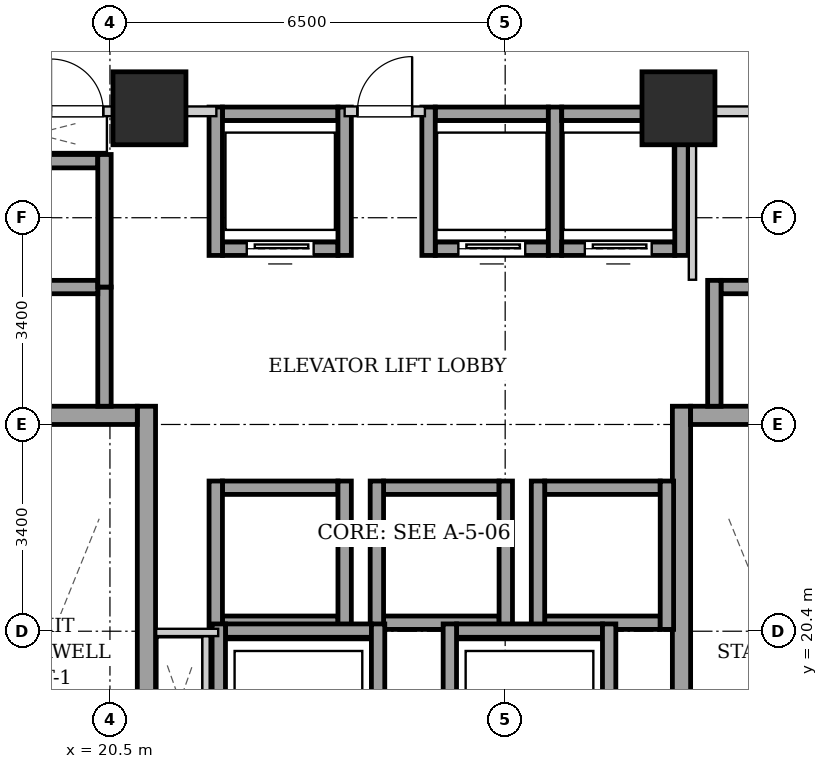
"""IFC4 building model, lengths in metres.
Left out: names, types, materials, properties, quantities, classifications, styles, units other than length and angle.
Written with IfcOpenShell. Run it as: python <this file> out.ifc"""

import sys

from ifc_helpers import new_model, si_unit, direction, frame, frame_2d, origin, origin_2d, place, context, subcontext, project, spatial, rectangle, extrude, element, fill, save


model = new_model("IFC4")
c1 = context("Model", 3, precision=1e-05, world=origin(), true_north=direction((0.0, 1.0)))
c2 = subcontext(c1, "Body", "Model", "MODEL_VIEW")
j1 = project(units=[si_unit("LENGTHUNIT", "METRE"), si_unit("PLANEANGLEUNIT", "RADIAN")], contexts=[c1])
p1 = place(None, origin())
s1 = spatial("IfcSite", under=j1, at=p1, CompositionType="ELEMENT")
p2 = place(p1, origin())
s2 = spatial("IfcBuilding", under=s1, at=p2, CompositionType="ELEMENT")
p3 = place(p2, frame((0.0, 0.0, 48.2)))
s3 = spatial("IfcBuildingStorey", under=s2, at=p3, CompositionType="ELEMENT", Elevation=48.2)
for number, where, z_axis, x_axis in (
    (1, (21.15, 29.0, 0.0), (0.0, 0.0, 1.0), (1.0, 0.0, 0.0)),
    (2, (29.85, 29.0, 0.0), (0.0, 0.0, 1.0), (1.0, 0.0, 0.0)),
):
    element("IfcColumn", number, at=place(p3, frame(where, z_axis=z_axis, x_axis=x_axis)), inside=s3, PredefinedType="COLUMN", context=c2, shape_type="SweptSolid", body=[
        extrude(rectangle(XDim=1.2, YDim=1.2, at=origin_2d()), origin(), (0.0, 0.0, 1.0), 3.2),
    ])
p4 = place(p3, frame((21.1, 15.1, 0.0), z_axis=(0.0, 0.0, 1.0), x_axis=(0.0, 1.0, 0.0)))
e3 = element("IfcWall", 3, at=p4, inside=s3, PredefinedType="SHEAR", context=c2, shape_type="SweptSolid", body=[
    extrude(rectangle(XDim=9.0, YDim=0.3, at=frame_2d((4.5, 0.0))), origin(), (0.0, 0.0, 1.0), 2.94),
])
p5 = place(p3, frame((18.1, 23.95, 0.0), z_axis=(0.0, 0.0, 1.0), x_axis=(1.0, 0.0, 0.0)))
e4 = element("IfcWall", 4, at=p5, inside=s3, PredefinedType="SHEAR", context=c2, shape_type="SweptSolid", body=[
    extrude(rectangle(XDim=2.85, YDim=0.3, at=frame_2d((1.425, 0.0))), origin(), (0.0, 0.0, 1.0), 2.94),
])
p6 = place(p3, frame((29.9, 15.1, 0.0), z_axis=(0.0, 0.0, 1.0), x_axis=(0.0, 1.0, 0.0)))
e5 = element("IfcWall", 5, at=p6, inside=s3, PredefinedType="SHEAR", context=c2, shape_type="SweptSolid", body=[
    extrude(rectangle(XDim=9.0, YDim=0.3, at=frame_2d((4.5, 0.0))), origin(), (0.0, 0.0, 1.0), 2.94),
])
p7 = place(p3, frame((30.05, 23.95, 0.0), z_axis=(0.0, 0.0, 1.0), x_axis=(1.0, 0.0, 0.0)))
e6 = element("IfcWall", 6, at=p7, inside=s3, PredefinedType="SHEAR", context=c2, shape_type="SweptSolid", body=[
    extrude(rectangle(XDim=2.85, YDim=0.3, at=frame_2d((1.425, 0.0))), origin(), (0.0, 0.0, 1.0), 2.94),
])
p8 = place(p3, frame((22.35, 26.69, 0.0), z_axis=(0.0, 0.0, 1.0), x_axis=(1.0, 0.0, 0.0)))
e7 = element("IfcWall", 7, at=p8, inside=s3, PredefinedType="SHEAR", context=c2, shape_type="SweptSolid", body=[
    extrude(rectangle(XDim=1.9, YDim=0.22, at=frame_2d((0.95, 0.0))), origin(), (0.0, 0.0, 1.0), 2.94),
])
p9 = place(p8, frame((0.4, 0.0, 0.0)))
e8 = element("IfcOpeningElement", 8, at=p9, cuts=e7, PredefinedType="OPENING", context=c2, shape_type="SweptSolid", body=[
    extrude(rectangle(XDim=1.1, YDim=2.15, at=frame_2d((0.55, 1.075))), frame((0.0, 0.12, 0.0), z_axis=(0.0, -1.0, 0.0), x_axis=(1.0, 0.0, 0.0)), (0.0, 0.0, 1.0), 0.24),
])
p10 = place(p3, frame((22.35, 28.91, 0.0), z_axis=(0.0, 0.0, 1.0), x_axis=(1.0, 0.0, 0.0)))
e9 = element("IfcWall", 9, at=p10, inside=s3, PredefinedType="SHEAR", context=c2, shape_type="SweptSolid", body=[
    extrude(rectangle(XDim=1.9, YDim=0.22, at=frame_2d((0.95, 0.0))), origin(), (0.0, 0.0, 1.0), 2.94),
])
for number, where, z_axis, x_axis in (
    (10, (22.24, 26.58, 0.0), (0.0, 0.0, 1.0), (0.0, 1.0, 0.0)),
    (11, (24.36, 26.58, 0.0), (0.0, 0.0, 1.0), (0.0, 1.0, 0.0)),
):
    element("IfcWall", number, at=place(p3, frame(where, z_axis=z_axis, x_axis=x_axis)), inside=s3, PredefinedType="SHEAR", context=c2, shape_type="SweptSolid", body=[
        extrude(rectangle(XDim=2.44, YDim=0.22, at=frame_2d((1.22, 0.0))), origin(), (0.0, 0.0, 1.0), 2.94),
    ])
p11 = place(p3, frame((25.85, 26.69, 0.0), z_axis=(0.0, 0.0, 1.0), x_axis=(1.0, 0.0, 0.0)))
e12 = element("IfcWall", 12, at=p11, inside=s3, PredefinedType="SHEAR", context=c2, shape_type="SweptSolid", body=[
    extrude(rectangle(XDim=1.86, YDim=0.22, at=frame_2d((0.93, 0.0))), origin(), (0.0, 0.0, 1.0), 2.94),
])
p12 = place(p11, frame((0.38, 0.0, 0.0)))
e13 = element("IfcOpeningElement", 13, at=p12, cuts=e12, PredefinedType="OPENING", context=c2, shape_type="SweptSolid", body=[
    extrude(rectangle(XDim=1.1, YDim=2.15, at=frame_2d((0.55, 1.075))), frame((0.0, 0.12, 0.0), z_axis=(0.0, -1.0, 0.0), x_axis=(1.0, 0.0, 0.0)), (0.0, 0.0, 1.0), 0.24),
])
p13 = place(p3, frame((25.85, 28.91, 0.0), z_axis=(0.0, 0.0, 1.0), x_axis=(1.0, 0.0, 0.0)))
e14 = element("IfcWall", 14, at=p13, inside=s3, PredefinedType="SHEAR", context=c2, shape_type="SweptSolid", body=[
    extrude(rectangle(XDim=1.86, YDim=0.22, at=frame_2d((0.93, 0.0))), origin(), (0.0, 0.0, 1.0), 2.94),
])
for number, where, z_axis, x_axis in (
    (15, (25.74, 26.58, 0.0), (0.0, 0.0, 1.0), (0.0, 1.0, 0.0)),
    (16, (27.82, 26.58, 0.0), (0.0, 0.0, 1.0), (0.0, 1.0, 0.0)),
):
    element("IfcWall", number, at=place(p3, frame(where, z_axis=z_axis, x_axis=x_axis)), inside=s3, PredefinedType="SHEAR", context=c2, shape_type="SweptSolid", body=[
        extrude(rectangle(XDim=2.44, YDim=0.22, at=frame_2d((1.22, 0.0))), origin(), (0.0, 0.0, 1.0), 2.94),
    ])
p14 = place(p3, frame((27.93, 26.69, 0.0), z_axis=(0.0, 0.0, 1.0), x_axis=(1.0, 0.0, 0.0)))
e17 = element("IfcWall", 17, at=p14, inside=s3, PredefinedType="SHEAR", context=c2, shape_type="SweptSolid", body=[
    extrude(rectangle(XDim=1.86, YDim=0.22, at=frame_2d((0.93, 0.0))), origin(), (0.0, 0.0, 1.0), 2.94),
])
p15 = place(p14, frame((0.38, 0.0, 0.0)))
e18 = element("IfcOpeningElement", 18, at=p15, cuts=e17, PredefinedType="OPENING", context=c2, shape_type="SweptSolid", body=[
    extrude(rectangle(XDim=1.1, YDim=2.15, at=frame_2d((0.55, 1.075))), frame((0.0, 0.12, 0.0), z_axis=(0.0, -1.0, 0.0), x_axis=(1.0, 0.0, 0.0)), (0.0, 0.0, 1.0), 0.24),
])
p16 = place(p3, frame((27.93, 28.91, 0.0), z_axis=(0.0, 0.0, 1.0), x_axis=(1.0, 0.0, 0.0)))
e19 = element("IfcWall", 19, at=p16, inside=s3, PredefinedType="SHEAR", context=c2, shape_type="SweptSolid", body=[
    extrude(rectangle(XDim=1.86, YDim=0.22, at=frame_2d((0.93, 0.0))), origin(), (0.0, 0.0, 1.0), 2.94),
])
p17 = place(p3, frame((29.9, 26.58, 0.0), z_axis=(0.0, 0.0, 1.0), x_axis=(0.0, 1.0, 0.0)))
e20 = element("IfcWall", 20, at=p17, inside=s3, PredefinedType="SHEAR", context=c2, shape_type="SweptSolid", body=[
    extrude(rectangle(XDim=2.44, YDim=0.22, at=frame_2d((1.22, 0.0))), origin(), (0.0, 0.0, 1.0), 2.94),
])
for number, where, z_axis, x_axis in (
    (21, (22.35, 20.54, 0.0), (0.0, 0.0, 1.0), (1.0, 0.0, 0.0)),
    (22, (22.35, 22.76, 0.0), (0.0, 0.0, 1.0), (1.0, 0.0, 0.0)),
):
    element("IfcWall", number, at=place(p3, frame(where, z_axis=z_axis, x_axis=x_axis)), inside=s3, PredefinedType="SHEAR", context=c2, shape_type="SweptSolid", body=[
        extrude(rectangle(XDim=1.9, YDim=0.22, at=frame_2d((0.95, 0.0))), origin(), (0.0, 0.0, 1.0), 2.94),
    ])
for number, where, z_axis, x_axis in (
    (23, (22.24, 20.43, 0.0), (0.0, 0.0, 1.0), (0.0, 1.0, 0.0)),
    (24, (24.36, 20.43, 0.0), (0.0, 0.0, 1.0), (0.0, 1.0, 0.0)),
):
    element("IfcWall", number, at=place(p3, frame(where, z_axis=z_axis, x_axis=x_axis)), inside=s3, PredefinedType="SHEAR", context=c2, shape_type="SweptSolid", body=[
        extrude(rectangle(XDim=2.44, YDim=0.22, at=frame_2d((1.22, 0.0))), origin(), (0.0, 0.0, 1.0), 2.94),
    ])
for number, where, z_axis, x_axis in (
    (25, (25.0, 20.54, 0.0), (0.0, 0.0, 1.0), (1.0, 0.0, 0.0)),
    (26, (25.0, 22.76, 0.0), (0.0, 0.0, 1.0), (1.0, 0.0, 0.0)),
):
    element("IfcWall", number, at=place(p3, frame(where, z_axis=z_axis, x_axis=x_axis)), inside=s3, PredefinedType="SHEAR", context=c2, shape_type="SweptSolid", body=[
        extrude(rectangle(XDim=1.9, YDim=0.22, at=frame_2d((0.95, 0.0))), origin(), (0.0, 0.0, 1.0), 2.94),
    ])
for number, where, z_axis, x_axis in (
    (27, (24.89, 20.43, 0.0), (0.0, 0.0, 1.0), (0.0, 1.0, 0.0)),
    (28, (27.01, 20.43, 0.0), (0.0, 0.0, 1.0), (0.0, 1.0, 0.0)),
):
    element("IfcWall", number, at=place(p3, frame(where, z_axis=z_axis, x_axis=x_axis)), inside=s3, PredefinedType="SHEAR", context=c2, shape_type="SweptSolid", body=[
        extrude(rectangle(XDim=2.44, YDim=0.22, at=frame_2d((1.22, 0.0))), origin(), (0.0, 0.0, 1.0), 2.94),
    ])
for number, where, z_axis, x_axis in (
    (29, (27.65, 20.54, 0.0), (0.0, 0.0, 1.0), (1.0, 0.0, 0.0)),
    (30, (27.65, 22.76, 0.0), (0.0, 0.0, 1.0), (1.0, 0.0, 0.0)),
):
    element("IfcWall", number, at=place(p3, frame(where, z_axis=z_axis, x_axis=x_axis)), inside=s3, PredefinedType="SHEAR", context=c2, shape_type="SweptSolid", body=[
        extrude(rectangle(XDim=1.9, YDim=0.22, at=frame_2d((0.95, 0.0))), origin(), (0.0, 0.0, 1.0), 2.94),
    ])
for number, where, z_axis, x_axis in (
    (31, (27.54, 20.43, 0.0), (0.0, 0.0, 1.0), (0.0, 1.0, 0.0)),
    (32, (29.66, 20.43, 0.0), (0.0, 0.0, 1.0), (0.0, 1.0, 0.0)),
):
    element("IfcWall", number, at=place(p3, frame(where, z_axis=z_axis, x_axis=x_axis)), inside=s3, PredefinedType="SHEAR", context=c2, shape_type="SweptSolid", body=[
        extrude(rectangle(XDim=2.44, YDim=0.22, at=frame_2d((1.22, 0.0))), origin(), (0.0, 0.0, 1.0), 2.94),
    ])
p18 = place(p3, frame((20.41, 24.1, 0.0), z_axis=(0.0, 0.0, 1.0), x_axis=(0.0, 1.0, 0.0)))
e33 = element("IfcWall", 33, at=p18, inside=s3, PredefinedType="SHEAR", context=c2, shape_type="SweptSolid", body=[
    extrude(rectangle(XDim=1.96, YDim=0.22, at=frame_2d((0.98, 0.0))), origin(), (0.0, 0.0, 1.0), 2.94),
])
for number, where, z_axis, x_axis in (
    (34, (18.4, 26.06, 0.0), (0.0, 0.0, 1.0), (1.0, 0.0, 0.0)),
    (35, (18.4, 28.13, 0.0), (0.0, 0.0, 1.0), (1.0, 0.0, 0.0)),
):
    element("IfcWall", number, at=place(p3, frame(where, z_axis=z_axis, x_axis=x_axis)), inside=s3, PredefinedType="SHEAR", context=c2, shape_type="SweptSolid", body=[
        extrude(rectangle(XDim=1.9, YDim=0.22, at=frame_2d((0.95, 0.0))), origin(), (0.0, 0.0, 1.0), 2.94),
    ])
p19 = place(p3, frame((20.41, 26.06, 0.0), z_axis=(0.0, 0.0, 1.0), x_axis=(0.0, 1.0, 0.0)))
e36 = element("IfcWall", 36, at=p19, inside=s3, PredefinedType="SHEAR", context=c2, shape_type="SweptSolid", body=[
    extrude(rectangle(XDim=2.18, YDim=0.22, at=frame_2d((1.09, 0.0))), origin(), (0.0, 0.0, 1.0), 2.94),
])
p20 = place(p3, frame((30.55, 26.06, 0.0), z_axis=(0.0, 0.0, 1.0), x_axis=(1.0, 0.0, 0.0)))
e37 = element("IfcWall", 37, at=p20, inside=s3, PredefinedType="SHEAR", context=c2, shape_type="SweptSolid", body=[
    extrude(rectangle(XDim=1.9, YDim=0.22, at=frame_2d((0.95, 0.0))), origin(), (0.0, 0.0, 1.0), 2.94),
])
p21 = place(p3, frame((30.44, 24.1, 0.0), z_axis=(0.0, 0.0, 1.0), x_axis=(0.0, 1.0, 0.0)))
e38 = element("IfcWall", 38, at=p21, inside=s3, PredefinedType="SHEAR", context=c2, shape_type="SweptSolid", body=[
    extrude(rectangle(XDim=2.07, YDim=0.22, at=frame_2d((1.035, 0.0))), origin(), (0.0, 0.0, 1.0), 2.94),
])
p22 = place(p3, frame((22.4, 20.41, 0.0), z_axis=(0.0, 0.0, 1.0), x_axis=(1.0, 0.0, 0.0)))
e39 = element("IfcWall", 39, at=p22, inside=s3, PredefinedType="SHEAR", context=c2, shape_type="SweptSolid", body=[
    extrude(rectangle(XDim=2.4, YDim=0.22, at=frame_2d((1.2, 0.0))), origin(), (0.0, 0.0, 1.0), 2.94),
])
for number, where, z_axis, x_axis in (
    (40, (22.29, 17.98, 0.0), (0.0, 0.0, 1.0), (0.0, 1.0, 0.0)),
    (41, (24.91, 17.98, 0.0), (0.0, 0.0, 1.0), (0.0, 1.0, 0.0)),
):
    element("IfcWall", number, at=place(p3, frame(where, z_axis=z_axis, x_axis=x_axis)), inside=s3, PredefinedType="SHEAR", context=c2, shape_type="SweptSolid", body=[
        extrude(rectangle(XDim=2.54, YDim=0.22, at=frame_2d((1.27, 0.0))), origin(), (0.0, 0.0, 1.0), 2.94),
    ])
p23 = place(p3, frame((26.2, 20.41, 0.0), z_axis=(0.0, 0.0, 1.0), x_axis=(1.0, 0.0, 0.0)))
e42 = element("IfcWall", 42, at=p23, inside=s3, PredefinedType="SHEAR", context=c2, shape_type="SweptSolid", body=[
    extrude(rectangle(XDim=2.4, YDim=0.22, at=frame_2d((1.2, 0.0))), origin(), (0.0, 0.0, 1.0), 2.94),
])
for number, where, z_axis, x_axis in (
    (43, (26.09, 17.98, 0.0), (0.0, 0.0, 1.0), (0.0, 1.0, 0.0)),
    (44, (28.71, 17.98, 0.0), (0.0, 0.0, 1.0), (0.0, 1.0, 0.0)),
):
    element("IfcWall", number, at=place(p3, frame(where, z_axis=z_axis, x_axis=x_axis)), inside=s3, PredefinedType="SHEAR", context=c2, shape_type="SweptSolid", body=[
        extrude(rectangle(XDim=2.54, YDim=0.22, at=frame_2d((1.27, 0.0))), origin(), (0.0, 0.0, 1.0), 2.94),
    ])
p24 = place(p3, frame((24.36, 28.95, 0.0), z_axis=(0.0, 0.0, 1.0), x_axis=(1.0, 0.0, 0.0)))
e45 = element("IfcWall", 45, at=p24, inside=s3, PredefinedType="PARTITIONING", context=c2, shape_type="SweptSolid", body=[
    extrude(rectangle(XDim=1.32, YDim=0.16, at=frame_2d((0.66, 0.0))), origin(), (0.0, 0.0, 1.0), 2.232),
])
p25 = place(p24, frame((0.21, 0.0, 0.0)))
e46 = element("IfcOpeningElement", 46, at=p25, cuts=e45, PredefinedType="OPENING", context=c2, shape_type="SweptSolid", body=[
    extrude(rectangle(XDim=0.9, YDim=2.05, at=frame_2d((0.45, 1.025))), frame((0.0, 0.09, 0.0), z_axis=(0.0, -1.0, 0.0), x_axis=(1.0, 0.0, 0.0)), (0.0, 0.0, 1.0), 0.18),
])
p26 = place(p3, frame((17.96, 28.95, 0.0), z_axis=(0.0, 0.0, 1.0), x_axis=(1.0, 0.0, 0.0)))
e47 = element("IfcWall", 47, at=p26, inside=s3, PredefinedType="PARTITIONING", context=c2, shape_type="SweptSolid", body=[
    extrude(rectangle(XDim=4.29, YDim=0.16, at=frame_2d((2.145, 0.0))), origin(), (0.0, 0.0, 1.0), 2.232),
])
p27 = place(p26, frame((1.57, 0.0, 0.0)))
e48 = element("IfcOpeningElement", 48, at=p27, cuts=e47, PredefinedType="OPENING", context=c2, shape_type="SweptSolid", body=[
    extrude(rectangle(XDim=0.86, YDim=2.05, at=frame_2d((0.43, 1.025))), frame((0.0, 0.09, 0.0), z_axis=(0.0, -1.0, 0.0), x_axis=(1.0, 0.0, 0.0)), (0.0, 0.0, 1.0), 0.18),
])
p28 = place(p3, frame((22.08, 18.2, 0.0), z_axis=(0.0, 0.0, 1.0), x_axis=(0.0, 1.0, 0.0)))
e49 = element("IfcWall", 49, at=p28, inside=s3, PredefinedType="PARTITIONING", context=c2, shape_type="SweptSolid", body=[
    extrude(rectangle(XDim=2.12, YDim=0.12, at=frame_2d((1.06, 0.0))), origin(), (0.0, 0.0, 1.0), 2.94),
])
p29 = place(p3, frame((22.28, 20.38, 0.0), z_axis=(0.0, 0.0, 1.0), x_axis=(-1.0, 0.0, 0.0)))
e50 = element("IfcWall", 50, at=p29, inside=s3, PredefinedType="PARTITIONING", context=c2, shape_type="SweptSolid", body=[
    extrude(rectangle(XDim=1.02, YDim=0.12, at=frame_2d((0.51, 0.0))), origin(), (0.0, 0.0, 1.0), 2.94),
])
p30 = place(p3, frame((30.08, 26.18, 0.0), z_axis=(0.0, 0.0, 1.0), x_axis=(0.0, 1.0, 0.0)))
e51 = element("IfcWall", 51, at=p30, inside=s3, PredefinedType="PARTITIONING", context=c2, shape_type="SweptSolid", body=[
    extrude(rectangle(XDim=2.68, YDim=0.12, at=frame_2d((1.34, 0.0))), origin(), (0.0, 0.0, 1.0), 2.94),
])
p31 = place(p3, frame((30.08, 28.95, 0.0), z_axis=(0.0, 0.0, 1.0), x_axis=(1.0, 0.0, 0.0)))
e52 = element("IfcWall", 52, at=p31, inside=s3, PredefinedType="PARTITIONING", context=c2, shape_type="SweptSolid", body=[
    extrude(rectangle(XDim=2.96, YDim=0.16, at=frame_2d((1.48, 0.0))), origin(), (0.0, 0.0, 1.0), 2.94),
])
p32 = place(p31, frame((1.045, 0.0, 0.0)))
e53 = element("IfcOpeningElement", 53, at=p32, cuts=e52, PredefinedType="OPENING", context=c2, shape_type="SweptSolid", body=[
    extrude(rectangle(XDim=0.86, YDim=2.05, at=frame_2d((0.43, 1.025))), frame((0.0, 0.09, 0.0), z_axis=(0.0, -1.0, 0.0), x_axis=(1.0, 0.0, 0.0)), (0.0, 0.0, 1.0), 0.18),
])
p33 = place(p9, origin())
e54 = element("IfcDoor", 54, at=p33, inside=s3, OperationType="SLIDING_TO_LEFT", PredefinedType="DOOR", context=c2, shape_type="SweptSolid", body=[
    extrude(rectangle(XDim=1.1, YDim=2.15, at=frame_2d((0.55, 1.075))), frame((0.0, 0.025, 0.0), z_axis=(0.0, -1.0, 0.0), x_axis=(1.0, 0.0, 0.0)), (0.0, 0.0, 1.0), 0.05),
])
fill(e8, e54)
p34 = place(p12, origin())
e55 = element("IfcDoor", 55, at=p34, inside=s3, OperationType="SLIDING_TO_LEFT", PredefinedType="DOOR", context=c2, shape_type="SweptSolid", body=[
    extrude(rectangle(XDim=1.1, YDim=2.15, at=frame_2d((0.55, 1.075))), frame((0.0, 0.025, 0.0), z_axis=(0.0, -1.0, 0.0), x_axis=(1.0, 0.0, 0.0)), (0.0, 0.0, 1.0), 0.05),
])
fill(e13, e55)
p35 = place(p15, origin())
e56 = element("IfcDoor", 56, at=p35, inside=s3, OperationType="SLIDING_TO_LEFT", PredefinedType="DOOR", context=c2, shape_type="SweptSolid", body=[
    extrude(rectangle(XDim=1.1, YDim=2.15, at=frame_2d((0.55, 1.075))), frame((0.0, 0.025, 0.0), z_axis=(0.0, -1.0, 0.0), x_axis=(1.0, 0.0, 0.0)), (0.0, 0.0, 1.0), 0.05),
])
fill(e18, e56)
p36 = place(p25, origin())
e57 = element("IfcDoor", 57, at=p36, inside=s3, OperationType="SINGLE_SWING_RIGHT", PredefinedType="DOOR", context=c2, shape_type="SweptSolid", body=[
    extrude(rectangle(XDim=0.9, YDim=2.05, at=frame_2d((0.45, 1.025))), frame((0.0, 0.025, 0.0), z_axis=(0.0, -1.0, 0.0), x_axis=(1.0, 0.0, 0.0)), (0.0, 0.0, 1.0), 0.05),
])
fill(e46, e57)
p37 = place(p27, origin())
e58 = element("IfcDoor", 58, at=p37, inside=s3, OperationType="SINGLE_SWING_LEFT", PredefinedType="DOOR", context=c2, shape_type="SweptSolid", body=[
    extrude(rectangle(XDim=0.86, YDim=2.05, at=frame_2d((0.43, 1.025))), frame((0.0, 0.025, 0.0), z_axis=(0.0, -1.0, 0.0), x_axis=(1.0, 0.0, 0.0)), (0.0, 0.0, 1.0), 0.05),
])
fill(e48, e58)
save(model, sys.argv[1])
